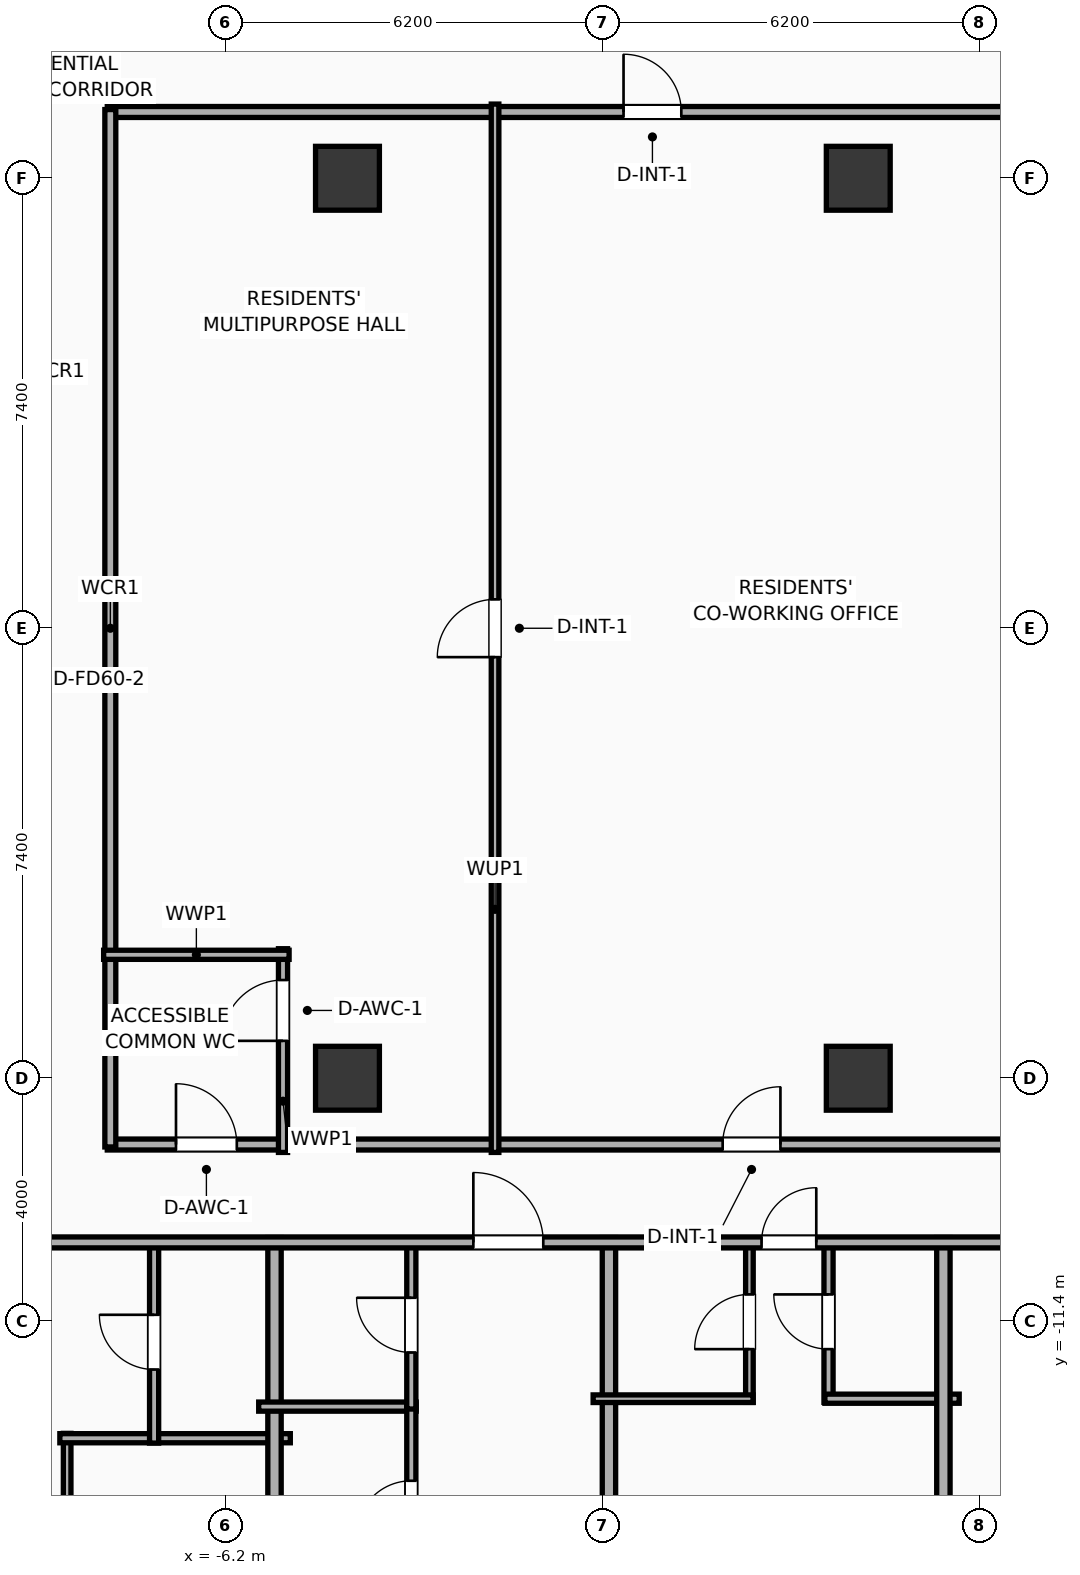
"""IFC4 building model, lengths in metres.
Left out: names, types, materials, properties, quantities, classifications, styles, units other than length and angle.
Written with IfcOpenShell. Run it as: python <this file> out.ifc"""

import sys

from ifc_helpers import new_model, si_unit, direction, frame, frame_2d, origin, origin_2d, place, context, subcontext, project, spatial, rectangle, extrude, element, fill, save


model = new_model("IFC4")
c1 = context("Model", 3, precision=1e-05, world=origin(), true_north=direction((0.0, 1.0)))
c2 = subcontext(c1, "Body", "Model", "MODEL_VIEW")
j1 = project(units=[si_unit("LENGTHUNIT", "METRE"), si_unit("PLANEANGLEUNIT", "RADIAN")], contexts=[c1])
p1 = place(None, origin())
s1 = spatial("IfcSite", under=j1, at=p1, CompositionType="ELEMENT")
p2 = place(p1, origin())
s2 = spatial("IfcBuilding", under=s1, at=p2, CompositionType="ELEMENT")
p3 = place(p2, frame((0.0, 0.0, 37.7)))
s3 = spatial("IfcBuildingStorey", under=s2, at=p3, CompositionType="ELEMENT", Elevation=37.7)
for number, where, z_axis, x_axis in (
    (1, (-4.2, -7.4, 0.0), (0.0, 0.0, 1.0), (1.0, 0.0, 0.0)),
    (2, (-4.2, 7.4, 0.0), (0.0, 0.0, 1.0), (1.0, 0.0, 0.0)),
    (3, (4.2, -7.4, 0.0), (0.0, 0.0, 1.0), (1.0, 0.0, 0.0)),
    (4, (4.2, 7.4, 0.0), (0.0, 0.0, 1.0), (1.0, 0.0, 0.0)),
):
    element("IfcColumn", number, at=place(p3, frame(where, z_axis=z_axis, x_axis=x_axis)), inside=s3, PredefinedType="COLUMN", context=c2, shape_type="SweptSolid", body=[
        extrude(rectangle(XDim=1.05, YDim=1.05, at=origin_2d()), origin(), (0.0, 0.0, 1.0), 3.9),
    ])
p4 = place(p3, frame((-8.15, 8.49, 0.0), z_axis=(0.0, 0.0, 1.0), x_axis=(1.0, 0.0, 0.0)))
e5 = element("IfcWall", 5, at=p4, inside=s3, PredefinedType="PARTITIONING", context=c2, shape_type="SweptSolid", body=[
    extrude(rectangle(XDim=16.3, YDim=0.18, at=frame_2d((8.15, 0.0))), origin(), (0.0, 0.0, 1.0), 3.65),
])
p5 = place(p4, frame((8.49, 0.0, 0.0)))
e6 = element("IfcOpeningElement", 6, at=p5, cuts=e5, PredefinedType="OPENING", context=c2, shape_type="SweptSolid", body=[
    extrude(rectangle(XDim=0.95, YDim=2.05, at=frame_2d((0.475, 1.025))), frame((0.0, 0.1, 0.0), z_axis=(0.0, -1.0, 0.0), x_axis=(1.0, 0.0, 0.0)), (0.0, 0.0, 1.0), 0.2),
])
p6 = place(p3, frame((-8.15, -8.49, 0.0), z_axis=(0.0, 0.0, 1.0), x_axis=(1.0, 0.0, 0.0)))
e7 = element("IfcWall", 7, at=p6, inside=s3, PredefinedType="PARTITIONING", context=c2, shape_type="SweptSolid", body=[
    extrude(rectangle(XDim=16.3, YDim=0.18, at=frame_2d((8.15, 0.0))), origin(), (0.0, 0.0, 1.0), 3.65),
])
p7 = place(p6, frame((1.13, 0.0, 0.0)))
e8 = element("IfcOpeningElement", 8, at=p7, cuts=e7, PredefinedType="OPENING", context=c2, shape_type="SweptSolid", body=[
    extrude(rectangle(XDim=1.0, YDim=2.05, at=frame_2d((0.5, 1.025))), frame((0.0, 0.1, 0.0), z_axis=(0.0, -1.0, 0.0), x_axis=(1.0, 0.0, 0.0)), (0.0, 0.0, 1.0), 0.2),
])
p8 = place(p6, frame((10.12, 0.0, 0.0)))
e9 = element("IfcOpeningElement", 9, at=p8, cuts=e7, PredefinedType="OPENING", context=c2, shape_type="SweptSolid", body=[
    extrude(rectangle(XDim=0.95, YDim=2.05, at=frame_2d((0.475, 1.025))), frame((0.0, 0.1, 0.0), z_axis=(0.0, -1.0, 0.0), x_axis=(1.0, 0.0, 0.0)), (0.0, 0.0, 1.0), 0.2),
])
p9 = place(p3, frame((-8.1, -8.53, 0.0), z_axis=(0.0, 0.0, 1.0), x_axis=(0.0, 1.0, 0.0)))
e10 = element("IfcWall", 10, at=p9, inside=s3, PredefinedType="PARTITIONING", context=c2, shape_type="SweptSolid", body=[
    extrude(rectangle(XDim=17.06, YDim=0.18, at=frame_2d((8.53, 0.0))), origin(), (0.0, 0.0, 1.0), 3.65),
])
p10 = place(p3, frame((-5.26, -8.62, 0.0), z_axis=(0.0, 0.0, 1.0), x_axis=(0.0, 1.0, 0.0)))
e11 = element("IfcWall", 11, at=p10, inside=s3, PredefinedType="PLUMBINGWALL", context=c2, shape_type="SweptSolid", body=[
    extrude(rectangle(XDim=3.35, YDim=0.15, at=frame_2d((1.675, 0.0))), origin(), (0.0, 0.0, 1.0), 3.65),
])
p11 = place(p10, frame((1.835, 0.0, 0.0)))
e12 = element("IfcOpeningElement", 12, at=p11, cuts=e11, PredefinedType="OPENING", context=c2, shape_type="SweptSolid", body=[
    extrude(rectangle(XDim=1.0, YDim=2.05, at=frame_2d((0.5, 1.025))), frame((0.0, 0.085, 0.0), z_axis=(0.0, -1.0, 0.0), x_axis=(1.0, 0.0, 0.0)), (0.0, 0.0, 1.0), 0.17),
])
p12 = place(p3, frame((-8.21, -5.37, 0.0), z_axis=(0.0, 0.0, 1.0), x_axis=(1.0, 0.0, 0.0)))
e13 = element("IfcWall", 13, at=p12, inside=s3, PredefinedType="PLUMBINGWALL", context=c2, shape_type="SweptSolid", body=[
    extrude(rectangle(XDim=3.05, YDim=0.15, at=frame_2d((1.525, 0.0))), origin(), (0.0, 0.0, 1.0), 3.65),
])
p13 = place(p3, frame((-1.773, -8.62, 0.0), z_axis=(0.0, 0.0, 1.0), x_axis=(0.0, 1.0, 0.0)))
e14 = element("IfcWall", 14, at=p13, inside=s3, PredefinedType="PARTITIONING", context=c2, shape_type="SweptSolid", body=[
    extrude(rectangle(XDim=17.24, YDim=0.125, at=frame_2d((8.62, 0.0))), origin(), (0.0, 0.0, 1.0), 3.65),
])
p14 = place(p13, frame((8.145, 0.0, 0.0)))
e15 = element("IfcOpeningElement", 15, at=p14, cuts=e14, PredefinedType="OPENING", context=c2, shape_type="SweptSolid", body=[
    extrude(rectangle(XDim=0.95, YDim=2.05, at=frame_2d((0.475, 1.025))), frame((0.0, 0.073, 0.0), z_axis=(0.0, -1.0, 0.0), x_axis=(1.0, 0.0, 0.0)), (0.0, 0.0, 1.0), 0.145),
])
p15 = place(p3, frame((-8.81, -22.36, 0.0), z_axis=(0.0, 0.0, 1.0), x_axis=(0.0, 1.0, 0.0)))
e16 = element("IfcWall", 16, at=p15, inside=s3, PredefinedType="PARTITIONING", context=c2, shape_type="SweptSolid", body=[
    extrude(rectangle(XDim=9.12, YDim=0.125, at=frame_2d((4.56, 0.0))), origin(), (0.0, 0.0, 1.0), 2.94),
])
p16 = place(p15, frame((6.481, 0.0, 0.0)))
e17 = element("IfcOpeningElement", 17, at=p16, cuts=e16, PredefinedType="OPENING", context=c2, shape_type="SweptSolid", body=[
    extrude(rectangle(XDim=0.9, YDim=2.05, at=frame_2d((0.45, 1.025))), frame((0.0, 0.073, 0.0), z_axis=(0.0, -1.0, 0.0), x_axis=(1.0, 0.0, 0.0)), (0.0, 0.0, 1.0), 0.145),
])
p17 = place(p3, frame((-8.93, -13.32, 0.0), z_axis=(0.0, 0.0, 1.0), x_axis=(1.0, 0.0, 0.0)))
e18 = element("IfcWall", 18, at=p17, inside=s3, PredefinedType="PLUMBINGWALL", context=c2, shape_type="SweptSolid", body=[
    extrude(rectangle(XDim=3.79, YDim=0.15, at=frame_2d((1.895, 0.0))), origin(), (0.0, 0.0, 1.0), 3.65),
])
p18 = place(p3, frame((-7.38, -13.4, 0.0), z_axis=(0.0, 0.0, 1.0), x_axis=(0.0, 1.0, 0.0)))
e19 = element("IfcWall", 19, at=p18, inside=s3, PredefinedType="PLUMBINGWALL", context=c2, shape_type="SweptSolid", body=[
    extrude(rectangle(XDim=3.32, YDim=0.15, at=frame_2d((1.66, 0.0))), origin(), (0.0, 0.0, 1.0), 3.65),
])
p19 = place(p18, frame((1.21, 0.0, 0.0)))
e20 = element("IfcOpeningElement", 20, at=p19, cuts=e19, PredefinedType="OPENING", context=c2, shape_type="SweptSolid", body=[
    extrude(rectangle(XDim=0.9, YDim=2.05, at=frame_2d((0.45, 1.025))), frame((0.0, 0.085, 0.0), z_axis=(0.0, -1.0, 0.0), x_axis=(1.0, 0.0, 0.0)), (0.0, 0.0, 1.0), 0.17),
])
p20 = place(p3, frame((-5.4, -22.21, 0.0), z_axis=(0.0, 0.0, 1.0), x_axis=(0.0, 1.0, 0.0)))
e21 = element("IfcWall", 21, at=p20, inside=s3, PredefinedType="PARTITIONING", context=c2, shape_type="SweptSolid", body=[
    extrude(rectangle(XDim=12.19, YDim=0.22, at=frame_2d((6.095, 0.0))), origin(), (0.0, 0.0, 1.0), 3.65),
])
p21 = place(p3, frame((-5.66, -12.8, 0.0), z_axis=(0.0, 0.0, 1.0), x_axis=(1.0, 0.0, 0.0)))
e22 = element("IfcWall", 22, at=p21, inside=s3, PredefinedType="PLUMBINGWALL", context=c2, shape_type="SweptSolid", body=[
    extrude(rectangle(XDim=2.59, YDim=0.15, at=frame_2d((1.295, 0.0))), origin(), (0.0, 0.0, 1.0), 3.65),
])
p22 = place(p3, frame((-3.15, -22.258, 0.0), z_axis=(0.0, 0.0, 1.0), x_axis=(0.0, 1.0, 0.0)))
e23 = element("IfcWall", 23, at=p22, inside=s3, PredefinedType="PLUMBINGWALL", context=c2, shape_type="SweptSolid", body=[
    extrude(rectangle(XDim=9.498, YDim=0.15, at=frame_2d((4.749, 0.0))), origin(), (0.0, 0.0, 1.0), 3.65),
])
p23 = place(p22, frame((7.338, 0.0, 0.0)))
e24 = element("IfcOpeningElement", 24, at=p23, cuts=e23, PredefinedType="OPENING", context=c2, shape_type="SweptSolid", body=[
    extrude(rectangle(XDim=0.9, YDim=2.05, at=frame_2d((0.45, 1.025))), frame((0.0, 0.085, 0.0), z_axis=(0.0, -1.0, 0.0), x_axis=(1.0, 0.0, 0.0)), (0.0, 0.0, 1.0), 0.17),
])
p24 = place(p3, frame((-3.15, -12.84, 0.0), z_axis=(0.0, 0.0, 1.0), x_axis=(0.0, 1.0, 0.0)))
e25 = element("IfcWall", 25, at=p24, inside=s3, PredefinedType="PLUMBINGWALL", context=c2, shape_type="SweptSolid", body=[
    extrude(rectangle(XDim=2.76, YDim=0.15, at=frame_2d((1.38, 0.0))), origin(), (0.0, 0.0, 1.0), 3.65),
])
p25 = place(p24, frame((0.93, 0.0, 0.0)))
e26 = element("IfcOpeningElement", 26, at=p25, cuts=e25, PredefinedType="OPENING", context=c2, shape_type="SweptSolid", body=[
    extrude(rectangle(XDim=0.9, YDim=2.05, at=frame_2d((0.45, 1.025))), frame((0.0, 0.085, 0.0), z_axis=(0.0, -1.0, 0.0), x_axis=(1.0, 0.0, 0.0)), (0.0, 0.0, 1.0), 0.17),
])
p26 = place(p3, frame((0.1, -22.21, 0.0), z_axis=(0.0, 0.0, 1.0), x_axis=(0.0, 1.0, 0.0)))
e27 = element("IfcWall", 27, at=p26, inside=s3, PredefinedType="PARTITIONING", context=c2, shape_type="SweptSolid", body=[
    extrude(rectangle(XDim=12.19, YDim=0.22, at=frame_2d((6.095, 0.0))), origin(), (0.0, 0.0, 1.0), 3.65),
])
p27 = place(p3, frame((2.41, -12.73, 0.0), z_axis=(0.0, 0.0, 1.0), x_axis=(0.0, 1.0, 0.0)))
e28 = element("IfcWall", 28, at=p27, inside=s3, PredefinedType="PARTITIONING", context=c2, shape_type="SweptSolid", body=[
    extrude(rectangle(XDim=2.65, YDim=0.125, at=frame_2d((1.325, 0.0))), origin(), (0.0, 0.0, 1.0), 3.65),
])
p28 = place(p27, frame((0.875, 0.0, 0.0)))
e29 = element("IfcOpeningElement", 29, at=p28, cuts=e28, PredefinedType="OPENING", context=c2, shape_type="SweptSolid", body=[
    extrude(rectangle(XDim=0.9, YDim=2.05, at=frame_2d((0.45, 1.025))), frame((0.0, 0.073, 0.0), z_axis=(0.0, -1.0, 0.0), x_axis=(1.0, 0.0, 0.0)), (0.0, 0.0, 1.0), 0.145),
])
p29 = place(p3, frame((3.711, -12.73, 0.0), z_axis=(0.0, 0.0, 1.0), x_axis=(0.0, 1.0, 0.0)))
e30 = element("IfcWall", 30, at=p29, inside=s3, PredefinedType="PLUMBINGWALL", context=c2, shape_type="SweptSolid", body=[
    extrude(rectangle(XDim=2.65, YDim=0.15, at=frame_2d((1.325, 0.0))), origin(), (0.0, 0.0, 1.0), 2.94),
])
p30 = place(p29, frame((0.875, 0.0, 0.0)))
e31 = element("IfcOpeningElement", 31, at=p30, cuts=e30, PredefinedType="OPENING", context=c2, shape_type="SweptSolid", body=[
    extrude(rectangle(XDim=0.9, YDim=2.05, at=frame_2d((0.45, 1.025))), frame((0.0, 0.085, 0.0), z_axis=(0.0, -1.0, 0.0), x_axis=(1.0, 0.0, 0.0)), (0.0, 0.0, 1.0), 0.17),
])
p31 = place(p3, frame((-0.16, -12.67, 0.0), z_axis=(0.0, 0.0, 1.0), x_axis=(1.0, 0.0, 0.0)))
e32 = element("IfcWall", 32, at=p31, inside=s3, PredefinedType="PARTITIONING", context=c2, shape_type="SweptSolid", body=[
    extrude(rectangle(XDim=2.63, YDim=0.125, at=frame_2d((1.315, 0.0))), origin(), (0.0, 0.0, 1.0), 3.65),
])
p32 = place(p3, frame((3.651, -12.67, 0.0), z_axis=(0.0, 0.0, 1.0), x_axis=(1.0, 0.0, 0.0)))
e33 = element("IfcWall", 33, at=p32, inside=s3, PredefinedType="PLUMBINGWALL", context=c2, shape_type="SweptSolid", body=[
    extrude(rectangle(XDim=2.209, YDim=0.15, at=frame_2d((1.104, 0.0))), origin(), (0.0, 0.0, 1.0), 3.65),
])
p33 = place(p3, frame((5.6, -22.21, 0.0), z_axis=(0.0, 0.0, 1.0), x_axis=(0.0, 1.0, 0.0)))
e34 = element("IfcWall", 34, at=p33, inside=s3, PredefinedType="PARTITIONING", context=c2, shape_type="SweptSolid", body=[
    extrude(rectangle(XDim=12.19, YDim=0.22, at=frame_2d((6.095, 0.0))), origin(), (0.0, 0.0, 1.0), 3.65),
])
p34 = place(p3, frame((-33.41, -10.1, 0.0), z_axis=(0.0, 0.0, 1.0), x_axis=(1.0, 0.0, 0.0)))
e35 = element("IfcWall", 35, at=p34, inside=s3, PredefinedType="PARTITIONING", context=c2, shape_type="SweptSolid", body=[
    extrude(rectangle(XDim=59.62, YDim=0.18, at=frame_2d((29.81, 0.0))), origin(), (0.0, 0.0, 1.0), 3.65),
])
p35 = place(p34, frame((2.746, 0.0, 0.0)))
e36 = element("IfcOpeningElement", 36, at=p35, cuts=e35, PredefinedType="OPENING", context=c2, shape_type="SweptSolid", body=[
    extrude(rectangle(XDim=0.9, YDim=2.05, at=frame_2d((0.45, 1.025))), frame((0.0, 0.1, 0.0), z_axis=(0.0, -1.0, 0.0), x_axis=(1.0, 0.0, 0.0)), (0.0, 0.0, 1.0), 0.2),
])
p36 = place(p34, frame((11.552, 0.0, 0.0)))
e37 = element("IfcOpeningElement", 37, at=p36, cuts=e35, PredefinedType="OPENING", context=c2, shape_type="SweptSolid", body=[
    extrude(rectangle(XDim=1.15, YDim=2.05, at=frame_2d((0.575, 1.025))), frame((0.0, 0.1, 0.0), z_axis=(0.0, -1.0, 0.0), x_axis=(1.0, 0.0, 0.0)), (0.0, 0.0, 1.0), 0.2),
])
p37 = place(p34, frame((22.379, 0.0, 0.0)))
e38 = element("IfcOpeningElement", 38, at=p37, cuts=e35, PredefinedType="OPENING", context=c2, shape_type="SweptSolid", body=[
    extrude(rectangle(XDim=1.15, YDim=2.05, at=frame_2d((0.575, 1.025))), frame((0.0, 0.1, 0.0), z_axis=(0.0, -1.0, 0.0), x_axis=(1.0, 0.0, 0.0)), (0.0, 0.0, 1.0), 0.2),
])
p38 = place(p34, frame((31.28, 0.0, 0.0)))
e39 = element("IfcOpeningElement", 39, at=p38, cuts=e35, PredefinedType="OPENING", context=c2, shape_type="SweptSolid", body=[
    extrude(rectangle(XDim=1.15, YDim=2.05, at=frame_2d((0.575, 1.025))), frame((0.0, 0.1, 0.0), z_axis=(0.0, -1.0, 0.0), x_axis=(1.0, 0.0, 0.0)), (0.0, 0.0, 1.0), 0.2),
])
p39 = place(p34, frame((36.02, 0.0, 0.0)))
e40 = element("IfcOpeningElement", 40, at=p39, cuts=e35, PredefinedType="OPENING", context=c2, shape_type="SweptSolid", body=[
    extrude(rectangle(XDim=0.9, YDim=2.05, at=frame_2d((0.45, 1.025))), frame((0.0, 0.1, 0.0), z_axis=(0.0, -1.0, 0.0), x_axis=(1.0, 0.0, 0.0)), (0.0, 0.0, 1.0), 0.2),
])
p40 = place(p34, frame((40.044, 0.0, 0.0)))
e41 = element("IfcOpeningElement", 41, at=p40, cuts=e35, PredefinedType="OPENING", context=c2, shape_type="SweptSolid", body=[
    extrude(rectangle(XDim=1.15, YDim=2.05, at=frame_2d((0.575, 1.025))), frame((0.0, 0.1, 0.0), z_axis=(0.0, -1.0, 0.0), x_axis=(1.0, 0.0, 0.0)), (0.0, 0.0, 1.0), 0.2),
])
p41 = place(p34, frame((45.613, 0.0, 0.0)))
e42 = element("IfcOpeningElement", 42, at=p41, cuts=e35, PredefinedType="OPENING", context=c2, shape_type="SweptSolid", body=[
    extrude(rectangle(XDim=1.15, YDim=2.05, at=frame_2d((0.575, 1.025))), frame((0.0, 0.1, 0.0), z_axis=(0.0, -1.0, 0.0), x_axis=(1.0, 0.0, 0.0)), (0.0, 0.0, 1.0), 0.2),
])
p42 = place(p34, frame((54.174, 0.0, 0.0)))
e43 = element("IfcOpeningElement", 43, at=p42, cuts=e35, PredefinedType="OPENING", context=c2, shape_type="SweptSolid", body=[
    extrude(rectangle(XDim=1.15, YDim=2.05, at=frame_2d((0.575, 1.025))), frame((0.0, 0.1, 0.0), z_axis=(0.0, -1.0, 0.0), x_axis=(1.0, 0.0, 0.0)), (0.0, 0.0, 1.0), 0.2),
])
p43 = place(p5, origin())
e44 = element("IfcDoor", 44, at=p43, inside=s3, OperationType="SINGLE_SWING_LEFT", PredefinedType="DOOR", context=c2, shape_type="SweptSolid", body=[
    extrude(rectangle(XDim=0.95, YDim=2.05, at=frame_2d((0.475, 1.025))), frame((0.0, 0.025, 0.0), z_axis=(0.0, -1.0, 0.0), x_axis=(1.0, 0.0, 0.0)), (0.0, 0.0, 1.0), 0.05),
])
fill(e6, e44)
p44 = place(p7, origin())
e45 = element("IfcDoor", 45, at=p44, inside=s3, OperationType="SINGLE_SWING_LEFT", PredefinedType="DOOR", context=c2, shape_type="SweptSolid", body=[
    extrude(rectangle(XDim=1.0, YDim=2.05, at=frame_2d((0.5, 1.025))), frame((0.0, 0.025, 0.0), z_axis=(0.0, -1.0, 0.0), x_axis=(1.0, 0.0, 0.0)), (0.0, 0.0, 1.0), 0.05),
])
fill(e8, e45)
p45 = place(p8, origin())
e46 = element("IfcDoor", 46, at=p45, inside=s3, OperationType="SINGLE_SWING_RIGHT", PredefinedType="DOOR", context=c2, shape_type="SweptSolid", body=[
    extrude(rectangle(XDim=0.95, YDim=2.05, at=frame_2d((0.475, 1.025))), frame((0.0, 0.025, 0.0), z_axis=(0.0, -1.0, 0.0), x_axis=(1.0, 0.0, 0.0)), (0.0, 0.0, 1.0), 0.05),
])
fill(e9, e46)
p46 = place(p11, origin())
e47 = element("IfcDoor", 47, at=p46, inside=s3, OperationType="SINGLE_SWING_LEFT", PredefinedType="DOOR", context=c2, shape_type="SweptSolid", body=[
    extrude(rectangle(XDim=1.0, YDim=2.05, at=frame_2d((0.5, 1.025))), frame((0.0, 0.025, 0.0), z_axis=(0.0, -1.0, 0.0), x_axis=(1.0, 0.0, 0.0)), (0.0, 0.0, 1.0), 0.05),
])
fill(e12, e47)
p47 = place(p14, origin())
e48 = element("IfcDoor", 48, at=p47, inside=s3, OperationType="SINGLE_SWING_LEFT", PredefinedType="DOOR", context=c2, shape_type="SweptSolid", body=[
    extrude(rectangle(XDim=0.95, YDim=2.05, at=frame_2d((0.475, 1.025))), frame((0.0, 0.025, 0.0), z_axis=(0.0, -1.0, 0.0), x_axis=(1.0, 0.0, 0.0)), (0.0, 0.0, 1.0), 0.05),
])
fill(e15, e48)
p48 = place(p19, origin())
e49 = element("IfcDoor", 49, at=p48, inside=s3, OperationType="SINGLE_SWING_RIGHT", PredefinedType="DOOR", context=c2, shape_type="SweptSolid", body=[
    extrude(rectangle(XDim=0.9, YDim=2.05, at=frame_2d((0.45, 1.025))), frame((0.0, 0.025, 0.0), z_axis=(0.0, -1.0, 0.0), x_axis=(1.0, 0.0, 0.0)), (0.0, 0.0, 1.0), 0.05),
])
fill(e20, e49)
p49 = place(p23, origin())
e50 = element("IfcDoor", 50, at=p49, inside=s3, OperationType="SINGLE_SWING_LEFT", PredefinedType="DOOR", context=c2, shape_type="SweptSolid", body=[
    extrude(rectangle(XDim=0.9, YDim=2.05, at=frame_2d((0.45, 1.025))), frame((0.0, 0.025, 0.0), z_axis=(0.0, -1.0, 0.0), x_axis=(1.0, 0.0, 0.0)), (0.0, 0.0, 1.0), 0.05),
])
fill(e24, e50)
p50 = place(p25, origin())
e51 = element("IfcDoor", 51, at=p50, inside=s3, OperationType="SINGLE_SWING_RIGHT", PredefinedType="DOOR", context=c2, shape_type="SweptSolid", body=[
    extrude(rectangle(XDim=0.9, YDim=2.05, at=frame_2d((0.45, 1.025))), frame((0.0, 0.025, 0.0), z_axis=(0.0, -1.0, 0.0), x_axis=(1.0, 0.0, 0.0)), (0.0, 0.0, 1.0), 0.05),
])
fill(e26, e51)
p51 = place(p28, origin())
e52 = element("IfcDoor", 52, at=p51, inside=s3, OperationType="SINGLE_SWING_LEFT", PredefinedType="DOOR", context=c2, shape_type="SweptSolid", body=[
    extrude(rectangle(XDim=0.9, YDim=2.05, at=frame_2d((0.45, 1.025))), frame((0.0, 0.025, 0.0), z_axis=(0.0, -1.0, 0.0), x_axis=(1.0, 0.0, 0.0)), (0.0, 0.0, 1.0), 0.05),
])
fill(e29, e52)
p52 = place(p30, origin())
e53 = element("IfcDoor", 53, at=p52, inside=s3, OperationType="SINGLE_SWING_RIGHT", PredefinedType="DOOR", context=c2, shape_type="SweptSolid", body=[
    extrude(rectangle(XDim=0.9, YDim=2.05, at=frame_2d((0.45, 1.025))), frame((0.0, 0.025, 0.0), z_axis=(0.0, -1.0, 0.0), x_axis=(1.0, 0.0, 0.0)), (0.0, 0.0, 1.0), 0.05),
])
fill(e31, e53)
p53 = place(p38, origin())
e54 = element("IfcDoor", 54, at=p53, inside=s3, OperationType="SINGLE_SWING_LEFT", PredefinedType="DOOR", context=c2, shape_type="SweptSolid", body=[
    extrude(rectangle(XDim=1.15, YDim=2.05, at=frame_2d((0.575, 1.025))), frame((0.0, 0.025, 0.0), z_axis=(0.0, -1.0, 0.0), x_axis=(1.0, 0.0, 0.0)), (0.0, 0.0, 1.0), 0.05),
])
fill(e39, e54)
p54 = place(p39, origin())
e55 = element("IfcDoor", 55, at=p54, inside=s3, OperationType="SINGLE_SWING_RIGHT", PredefinedType="DOOR", context=c2, shape_type="SweptSolid", body=[
    extrude(rectangle(XDim=0.9, YDim=2.05, at=frame_2d((0.45, 1.025))), frame((0.0, 0.025, 0.0), z_axis=(0.0, -1.0, 0.0), x_axis=(1.0, 0.0, 0.0)), (0.0, 0.0, 1.0), 0.05),
])
fill(e40, e55)
save(model, sys.argv[1])
